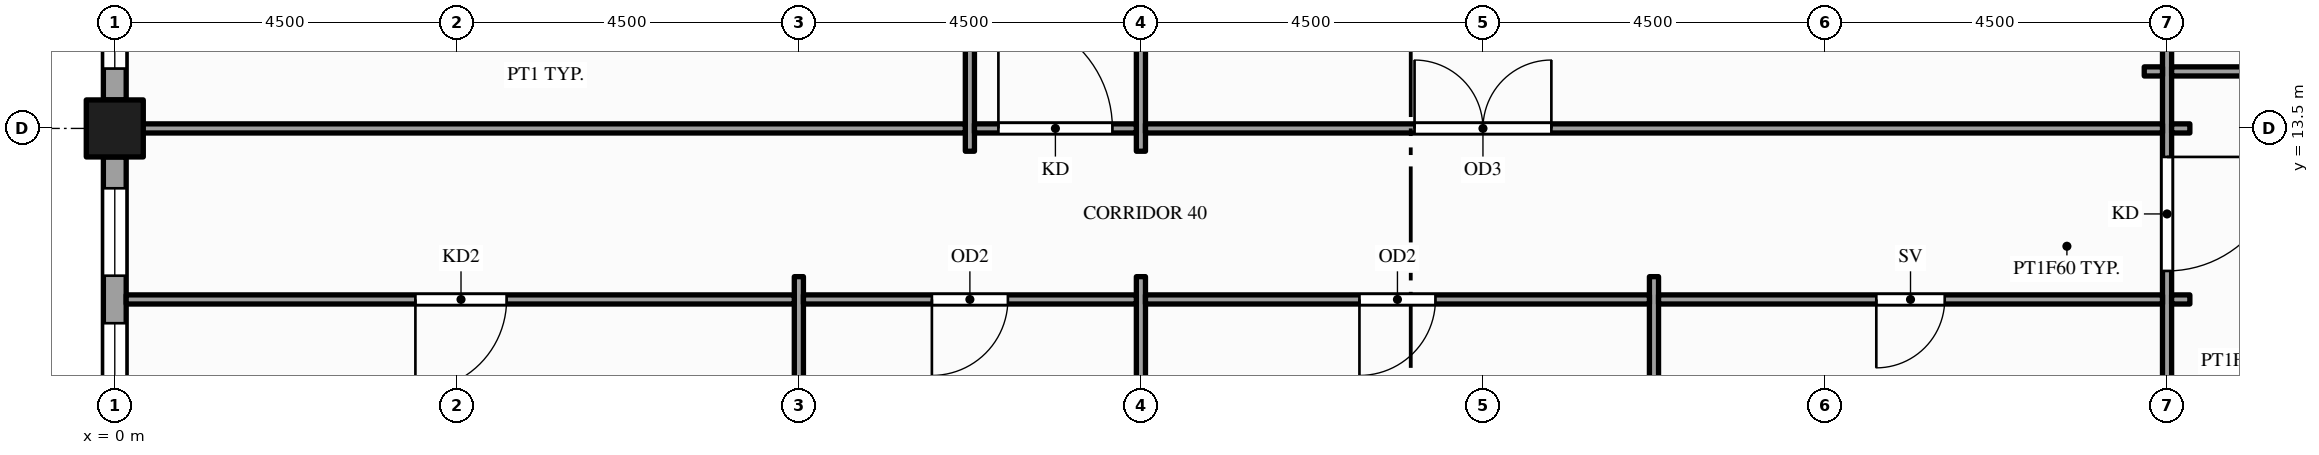
"""IFC4 building model, lengths in metres.
Left out: names, types, materials, properties, quantities, classifications, styles, units other than length and angle.
Written with IfcOpenShell. Run it as: python <this file> out.ifc"""

import sys

from ifc_helpers import new_model, si_unit, direction, frame, frame_2d, origin, origin_2d, place, context, subcontext, project, spatial, rectangle, hollow_rectangle, extrude, element, fill, save


model = new_model("IFC4")
c1 = context("Model", 3, precision=1e-05, world=origin(), true_north=direction((0.0, 1.0)))
c2 = subcontext(c1, "Body", "Model", "MODEL_VIEW")
j1 = project(units=[si_unit("LENGTHUNIT", "METRE"), si_unit("PLANEANGLEUNIT", "RADIAN")], contexts=[c1])
p1 = place(None, origin())
s1 = spatial("IfcSite", under=j1, at=p1, CompositionType="ELEMENT")
p2 = place(p1, origin())
s2 = spatial("IfcBuilding", under=s1, at=p2, CompositionType="ELEMENT")
p3 = place(p2, frame((0.0, 0.0, 211.0)))
s3 = spatial("IfcBuildingStorey", under=s2, at=p3, CompositionType="ELEMENT", Elevation=211.0)
p4 = place(p3, frame((0.0, 13.5, -0.15), z_axis=(0.0, 0.0, 1.0), x_axis=(1.0, 0.0, 0.0)))
e1 = element("IfcColumn", 1, at=p4, inside=s3, PredefinedType="COLUMN", context=c2, shape_type="SweptSolid", body=[
    extrude(hollow_rectangle(XDim=0.75, YDim=0.75, WallThickness=0.036, at=origin_2d()), origin(), (0.0, 0.0, 1.0), 4.0),
])
p5 = place(p3, frame((0.0, 17.625, 0.0), z_axis=(0.0, 0.0, 1.0), x_axis=(0.0, -1.0, 0.0)))
e2 = element("IfcWall", 2, at=p5, inside=s3, PredefinedType="STANDARD", context=c2, shape_type="SweptSolid", body=[
    extrude(rectangle(XDim=3.75, YDim=0.3, at=frame_2d((1.875, 0.0))), origin(), (0.0, 0.0, 1.0), 3.157),
])
p6 = place(p5, frame((0.413, 0.0, 0.9)))
e3 = element("IfcOpeningElement", 3, at=p6, cuts=e2, PredefinedType="OPENING", context=c2, shape_type="SweptSolid", body=[
    extrude(rectangle(XDim=1.15, YDim=2.0, at=frame_2d((0.575, 1.0))), frame((0.0, 0.16, 0.0), z_axis=(0.0, -1.0, 0.0), x_axis=(1.0, 0.0, 0.0)), (0.0, 0.0, 1.0), 0.32),
])
p7 = place(p5, frame((2.188, 0.0, 0.9)))
e4 = element("IfcOpeningElement", 4, at=p7, cuts=e2, PredefinedType="OPENING", context=c2, shape_type="SweptSolid", body=[
    extrude(rectangle(XDim=1.15, YDim=2.0, at=frame_2d((0.575, 1.0))), frame((0.0, 0.16, 0.0), z_axis=(0.0, -1.0, 0.0), x_axis=(1.0, 0.0, 0.0)), (0.0, 0.0, 1.0), 0.32),
])
p8 = place(p3, frame((0.0, 13.125, 0.0), z_axis=(0.0, 0.0, 1.0), x_axis=(0.0, -1.0, 0.0)))
e5 = element("IfcWall", 5, at=p8, inside=s3, PredefinedType="STANDARD", context=c2, shape_type="SweptSolid", body=[
    extrude(rectangle(XDim=3.75, YDim=0.3, at=frame_2d((1.875, 0.0))), origin(), (0.0, 0.0, 1.0), 3.157),
])
p9 = place(p8, frame((0.413, 0.0, 0.9)))
e6 = element("IfcOpeningElement", 6, at=p9, cuts=e5, PredefinedType="OPENING", context=c2, shape_type="SweptSolid", body=[
    extrude(rectangle(XDim=1.15, YDim=2.0, at=frame_2d((0.575, 1.0))), frame((0.0, 0.16, 0.0), z_axis=(0.0, -1.0, 0.0), x_axis=(1.0, 0.0, 0.0)), (0.0, 0.0, 1.0), 0.32),
])
p10 = place(p8, frame((2.188, 0.0, 0.9)))
e7 = element("IfcOpeningElement", 7, at=p10, cuts=e5, PredefinedType="OPENING", context=c2, shape_type="SweptSolid", body=[
    extrude(rectangle(XDim=1.15, YDim=2.0, at=frame_2d((0.575, 1.0))), frame((0.0, 0.16, 0.0), z_axis=(0.0, -1.0, 0.0), x_axis=(1.0, 0.0, 0.0)), (0.0, 0.0, 1.0), 0.32),
])
p11 = place(p3, frame((9.0, 3.875, 0.0), z_axis=(0.0, 0.0, 1.0), x_axis=(0.0, 1.0, 0.0)))
e8 = element("IfcWall", 8, at=p11, inside=s3, PredefinedType="PARTITIONING", context=c2, shape_type="SweptSolid", body=[
    extrude(rectangle(XDim=7.675, YDim=0.12, at=frame_2d((3.837, 0.0))), origin(), (0.0, 0.0, 1.0), 2.87),
])
p12 = place(p3, frame((11.25, 13.2, 0.0), z_axis=(0.0, 0.0, 1.0), x_axis=(0.0, 1.0, 0.0)))
e9 = element("IfcWall", 9, at=p12, inside=s3, PredefinedType="PARTITIONING", context=c2, shape_type="SweptSolid", body=[
    extrude(rectangle(XDim=18.6, YDim=0.12, at=frame_2d((9.3, 0.0))), origin(), (0.0, 0.0, 1.0), 2.6),
])
p13 = place(p12, frame((3.175, 0.0, 0.0)))
e10 = element("IfcOpeningElement", 10, at=p13, cuts=e9, PredefinedType="OPENING", context=c2, shape_type="SweptSolid", body=[
    extrude(rectangle(XDim=1.0, YDim=2.1, at=frame_2d((0.5, 1.05))), frame((0.0, 0.07, 0.0), z_axis=(0.0, -1.0, 0.0), x_axis=(1.0, 0.0, 0.0)), (0.0, 0.0, 1.0), 0.14),
])
p14 = place(p12, frame((9.955, 0.0, 0.0)))
e11 = element("IfcOpeningElement", 11, at=p14, cuts=e9, PredefinedType="OPENING", context=c2, shape_type="SweptSolid", body=[
    extrude(rectangle(XDim=1.0, YDim=2.1, at=frame_2d((0.5, 1.05))), frame((0.0, 0.07, 0.0), z_axis=(0.0, -1.0, 0.0), x_axis=(1.0, 0.0, 0.0)), (0.0, 0.0, 1.0), 0.14),
])
p15 = place(p3, frame((13.5, 0.15, 0.0), z_axis=(0.0, 0.0, 1.0), x_axis=(0.0, 1.0, 0.0)))
e12 = element("IfcWall", 12, at=p15, inside=s3, PredefinedType="PARTITIONING", context=c2, shape_type="SweptSolid", body=[
    extrude(rectangle(XDim=11.4, YDim=0.12, at=frame_2d((5.7, 0.0))), origin(), (0.0, 0.0, 1.0), 2.87),
])
p16 = place(p3, frame((13.5, 13.2, 0.0), z_axis=(0.0, 0.0, 1.0), x_axis=(0.0, 1.0, 0.0)))
e13 = element("IfcWall", 13, at=p16, inside=s3, PredefinedType="PARTITIONING", context=c2, shape_type="SweptSolid", body=[
    extrude(rectangle(XDim=18.6, YDim=0.12, at=frame_2d((9.3, 0.0))), origin(), (0.0, 0.0, 1.0), 2.6),
])
p17 = place(p16, frame((4.2, 0.0, 0.0)))
e14 = element("IfcOpeningElement", 14, at=p17, cuts=e13, PredefinedType="OPENING", context=c2, shape_type="SweptSolid", body=[
    extrude(rectangle(XDim=1.2, YDim=2.1, at=frame_2d((0.6, 1.05))), frame((0.0, 0.07, 0.0), z_axis=(0.0, -1.0, 0.0), x_axis=(1.0, 0.0, 0.0)), (0.0, 0.0, 1.0), 0.14),
])
p18 = place(p3, frame((20.25, 0.15, 0.0), z_axis=(0.0, 0.0, 1.0), x_axis=(0.0, 1.0, 0.0)))
e15 = element("IfcWall", 15, at=p18, inside=s3, PredefinedType="PARTITIONING", context=c2, shape_type="SweptSolid", body=[
    extrude(rectangle(XDim=11.4, YDim=0.12, at=frame_2d((5.7, 0.0))), origin(), (0.0, 0.0, 1.0), 2.87),
])
p19 = place(p3, frame((27.0, -1.35, 0.0), z_axis=(0.0, 0.0, 1.0), x_axis=(0.0, 1.0, 0.0)))
e16 = element("IfcWall", 16, at=p19, inside=s3, PredefinedType="PARTITIONING", context=c2, shape_type="SweptSolid", body=[
    extrude(rectangle(XDim=22.48, YDim=0.12, at=frame_2d((11.24, 0.0))), origin(), (0.0, 0.0, 1.0), 2.87),
])
p20 = place(p19, frame((12.975, 0.0, 0.0)))
e17 = element("IfcOpeningElement", 17, at=p20, cuts=e16, PredefinedType="OPENING", context=c2, shape_type="SweptSolid", body=[
    extrude(rectangle(XDim=1.5, YDim=2.1, at=frame_2d((0.75, 1.05))), frame((0.0, 0.07, 0.0), z_axis=(0.0, -1.0, 0.0), x_axis=(1.0, 0.0, 0.0)), (0.0, 0.0, 1.0), 0.14),
])
p21 = place(p3, frame((0.15, 11.25, 0.0), z_axis=(0.0, 0.0, 1.0), x_axis=(1.0, 0.0, 0.0)))
e18 = element("IfcWall", 18, at=p21, inside=s3, PredefinedType="PARTITIONING", context=c2, shape_type="SweptSolid", body=[
    extrude(rectangle(XDim=8.79, YDim=0.12, at=frame_2d((4.395, 0.0))), origin(), (0.0, 0.0, 1.0), 2.87),
])
p22 = place(p21, frame((3.805, 0.0, 0.0)))
e19 = element("IfcOpeningElement", 19, at=p22, cuts=e18, PredefinedType="OPENING", context=c2, shape_type="SweptSolid", body=[
    extrude(rectangle(XDim=1.2, YDim=2.1, at=frame_2d((0.6, 1.05))), frame((0.0, 0.07, 0.0), z_axis=(0.0, -1.0, 0.0), x_axis=(1.0, 0.0, 0.0)), (0.0, 0.0, 1.0), 0.14),
])
p23 = place(p3, frame((9.06, 11.25, 0.0), z_axis=(0.0, 0.0, 1.0), x_axis=(1.0, 0.0, 0.0)))
e20 = element("IfcWall", 20, at=p23, inside=s3, PredefinedType="PARTITIONING", context=c2, shape_type="SweptSolid", body=[
    extrude(rectangle(XDim=4.38, YDim=0.12, at=frame_2d((2.19, 0.0))), origin(), (0.0, 0.0, 1.0), 2.87),
])
p24 = place(p23, frame((1.69, 0.0, 0.0)))
e21 = element("IfcOpeningElement", 21, at=p24, cuts=e20, PredefinedType="OPENING", context=c2, shape_type="SweptSolid", body=[
    extrude(rectangle(XDim=1.0, YDim=2.1, at=frame_2d((0.5, 1.05))), frame((0.0, 0.07, 0.0), z_axis=(0.0, -1.0, 0.0), x_axis=(1.0, 0.0, 0.0)), (0.0, 0.0, 1.0), 0.14),
])
p25 = place(p3, frame((13.56, 11.25, 0.0), z_axis=(0.0, 0.0, 1.0), x_axis=(1.0, 0.0, 0.0)))
e22 = element("IfcWall", 22, at=p25, inside=s3, PredefinedType="PARTITIONING", context=c2, shape_type="SweptSolid", body=[
    extrude(rectangle(XDim=6.63, YDim=0.12, at=frame_2d((3.315, 0.0))), origin(), (0.0, 0.0, 1.0), 2.87),
])
p26 = place(p25, frame((2.815, 0.0, 0.0)))
e23 = element("IfcOpeningElement", 23, at=p26, cuts=e22, PredefinedType="OPENING", context=c2, shape_type="SweptSolid", body=[
    extrude(rectangle(XDim=1.0, YDim=2.1, at=frame_2d((0.5, 1.05))), frame((0.0, 0.07, 0.0), z_axis=(0.0, -1.0, 0.0), x_axis=(1.0, 0.0, 0.0)), (0.0, 0.0, 1.0), 0.14),
])
p27 = place(p3, frame((20.31, 11.25, 0.0), z_axis=(0.0, 0.0, 1.0), x_axis=(1.0, 0.0, 0.0)))
e24 = element("IfcWall", 24, at=p27, inside=s3, PredefinedType="PARTITIONING", context=c2, shape_type="SweptSolid", body=[
    extrude(rectangle(XDim=6.63, YDim=0.12, at=frame_2d((3.315, 0.0))), origin(), (0.0, 0.0, 1.0), 2.76),
])
p28 = place(p27, frame((2.865, 0.0, 0.0)))
e25 = element("IfcOpeningElement", 25, at=p28, cuts=e24, PredefinedType="OPENING", context=c2, shape_type="SweptSolid", body=[
    extrude(rectangle(XDim=0.9, YDim=2.1, at=frame_2d((0.45, 1.05))), frame((0.0, 0.07, 0.0), z_axis=(0.0, -1.0, 0.0), x_axis=(1.0, 0.0, 0.0)), (0.0, 0.0, 1.0), 0.14),
])
p29 = place(p3, frame((27.06, 11.25, 0.0), z_axis=(0.0, 0.0, 1.0), x_axis=(1.0, 0.0, 0.0)))
e26 = element("IfcWall", 26, at=p29, inside=s3, PredefinedType="PARTITIONING", context=c2, shape_type="SweptSolid", body=[
    extrude(rectangle(XDim=0.24, YDim=0.12, at=frame_2d((0.12, 0.0))), origin(), (0.0, 0.0, 1.0), 2.87),
])
p30 = place(p3, frame((0.15, 13.5, 0.0), z_axis=(0.0, 0.0, 1.0), x_axis=(1.0, 0.0, 0.0)))
e27 = element("IfcWall", 27, at=p30, inside=s3, PredefinedType="PARTITIONING", context=c2, shape_type="SweptSolid", body=[
    extrude(rectangle(XDim=11.04, YDim=0.12, at=frame_2d((5.52, 0.0))), origin(), (0.0, 0.0, 1.0), 2.87),
])
p31 = place(p3, frame((11.31, 13.5, 0.0), z_axis=(0.0, 0.0, 1.0), x_axis=(1.0, 0.0, 0.0)))
e28 = element("IfcWall", 28, at=p31, inside=s3, PredefinedType="PARTITIONING", context=c2, shape_type="SweptSolid", body=[
    extrude(rectangle(XDim=2.13, YDim=0.12, at=frame_2d((1.065, 0.0))), origin(), (0.0, 0.0, 1.0), 2.87),
])
p32 = place(p31, frame((0.315, 0.0, 0.0)))
e29 = element("IfcOpeningElement", 29, at=p32, cuts=e28, PredefinedType="OPENING", context=c2, shape_type="SweptSolid", body=[
    extrude(rectangle(XDim=1.5, YDim=2.1, at=frame_2d((0.75, 1.05))), frame((0.0, 0.07, 0.0), z_axis=(0.0, -1.0, 0.0), x_axis=(1.0, 0.0, 0.0)), (0.0, 0.0, 1.0), 0.14),
])
p33 = place(p3, frame((13.56, 13.5, 0.0), z_axis=(0.0, 0.0, 1.0), x_axis=(1.0, 0.0, 0.0)))
e30 = element("IfcWall", 30, at=p33, inside=s3, PredefinedType="PARTITIONING", context=c2, shape_type="SweptSolid", body=[
    extrude(rectangle(XDim=13.38, YDim=0.12, at=frame_2d((6.69, 0.0))), origin(), (0.0, 0.0, 1.0), 2.76),
])
p34 = place(p33, frame((3.54, 0.0, 0.0)))
e31 = element("IfcOpeningElement", 31, at=p34, cuts=e30, PredefinedType="OPENING", context=c2, shape_type="SweptSolid", body=[
    extrude(rectangle(XDim=1.8, YDim=2.1, at=frame_2d((0.9, 1.05))), frame((0.0, 0.07, 0.0), z_axis=(0.0, -1.0, 0.0), x_axis=(1.0, 0.0, 0.0)), (0.0, 0.0, 1.0), 0.14),
])
for number, where, z_axis, x_axis in (
    (32, (27.06, 13.5, 0.0), (0.0, 0.0, 1.0), (1.0, 0.0, 0.0)),
    (33, (26.7, 14.25, 0.0), (0.0, 0.0, 1.0), (1.0, 0.0, 0.0)),
):
    element("IfcWall", number, at=place(p3, frame(where, z_axis=z_axis, x_axis=x_axis)), inside=s3, PredefinedType="PARTITIONING", context=c2, shape_type="SweptSolid", body=[
        extrude(rectangle(XDim=0.24, YDim=0.12, at=frame_2d((0.12, 0.0))), origin(), (0.0, 0.0, 1.0), 2.87),
    ])
p35 = place(p3, frame((27.06, 14.25, 0.0), z_axis=(0.0, 0.0, 1.0), x_axis=(1.0, 0.0, 0.0)))
e34 = element("IfcWall", 34, at=p35, inside=s3, PredefinedType="PARTITIONING", context=c2, shape_type="SweptSolid", body=[
    extrude(rectangle(XDim=2.13, YDim=0.12, at=frame_2d((1.065, 0.0))), origin(), (0.0, 0.0, 1.0), 2.87),
])
p36 = place(p7, origin())
e35 = element("IfcWindow", 35, at=p36, inside=s3, PartitioningType="SINGLE_PANEL", PredefinedType="WINDOW", context=c2, shape_type="SweptSolid", body=[
    extrude(rectangle(XDim=1.15, YDim=2.0, at=frame_2d((0.575, 1.0))), frame((0.0, 0.03, 0.0), z_axis=(0.0, -1.0, 0.0), x_axis=(1.0, 0.0, 0.0)), (0.0, 0.0, 1.0), 0.06),
])
fill(e4, e35)
p37 = place(p9, origin())
e36 = element("IfcWindow", 36, at=p37, inside=s3, PartitioningType="SINGLE_PANEL", PredefinedType="WINDOW", context=c2, shape_type="SweptSolid", body=[
    extrude(rectangle(XDim=1.15, YDim=2.0, at=frame_2d((0.575, 1.0))), frame((0.0, 0.03, 0.0), z_axis=(0.0, -1.0, 0.0), x_axis=(1.0, 0.0, 0.0)), (0.0, 0.0, 1.0), 0.06),
])
fill(e6, e36)
p38 = place(p10, origin())
e37 = element("IfcWindow", 37, at=p38, inside=s3, PartitioningType="SINGLE_PANEL", PredefinedType="WINDOW", context=c2, shape_type="SweptSolid", body=[
    extrude(rectangle(XDim=1.15, YDim=2.0, at=frame_2d((0.575, 1.0))), frame((0.0, 0.03, 0.0), z_axis=(0.0, -1.0, 0.0), x_axis=(1.0, 0.0, 0.0)), (0.0, 0.0, 1.0), 0.06),
])
fill(e7, e37)
p39 = place(p20, origin())
e38 = element("IfcDoor", 38, at=p39, inside=s3, OperationType="SINGLE_SWING_RIGHT", PredefinedType="DOOR", context=c2, shape_type="SweptSolid", body=[
    extrude(rectangle(XDim=1.5, YDim=2.1, at=frame_2d((0.75, 1.05))), frame((0.0, 0.025, 0.0), z_axis=(0.0, -1.0, 0.0), x_axis=(1.0, 0.0, 0.0)), (0.0, 0.0, 1.0), 0.05),
])
fill(e17, e38)
p40 = place(p22, origin())
e39 = element("IfcDoor", 39, at=p40, inside=s3, OperationType="SINGLE_SWING_LEFT", PredefinedType="DOOR", context=c2, shape_type="SweptSolid", body=[
    extrude(rectangle(XDim=1.2, YDim=2.1, at=frame_2d((0.6, 1.05))), frame((0.0, 0.025, 0.0), z_axis=(0.0, -1.0, 0.0), x_axis=(1.0, 0.0, 0.0)), (0.0, 0.0, 1.0), 0.05),
])
fill(e19, e39)
p41 = place(p24, origin())
e40 = element("IfcDoor", 40, at=p41, inside=s3, OperationType="SINGLE_SWING_LEFT", PredefinedType="DOOR", context=c2, shape_type="SweptSolid", body=[
    extrude(rectangle(XDim=1.0, YDim=2.1, at=frame_2d((0.5, 1.05))), frame((0.0, 0.025, 0.0), z_axis=(0.0, -1.0, 0.0), x_axis=(1.0, 0.0, 0.0)), (0.0, 0.0, 1.0), 0.05),
])
fill(e21, e40)
p42 = place(p26, origin())
e41 = element("IfcDoor", 41, at=p42, inside=s3, OperationType="SINGLE_SWING_LEFT", PredefinedType="DOOR", context=c2, shape_type="SweptSolid", body=[
    extrude(rectangle(XDim=1.0, YDim=2.1, at=frame_2d((0.5, 1.05))), frame((0.0, 0.025, 0.0), z_axis=(0.0, -1.0, 0.0), x_axis=(1.0, 0.0, 0.0)), (0.0, 0.0, 1.0), 0.05),
])
fill(e23, e41)
p43 = place(p28, origin())
e42 = element("IfcDoor", 42, at=p43, inside=s3, OperationType="SINGLE_SWING_LEFT", PredefinedType="DOOR", context=c2, shape_type="SweptSolid", body=[
    extrude(rectangle(XDim=0.9, YDim=2.1, at=frame_2d((0.45, 1.05))), frame((0.0, 0.025, 0.0), z_axis=(0.0, -1.0, 0.0), x_axis=(1.0, 0.0, 0.0)), (0.0, 0.0, 1.0), 0.05),
])
fill(e25, e42)
p44 = place(p34, origin())
e43 = element("IfcDoor", 43, at=p44, inside=s3, OperationType="DOUBLE_DOOR_SINGLE_SWING", PredefinedType="DOOR", context=c2, shape_type="SweptSolid", body=[
    extrude(rectangle(XDim=1.8, YDim=2.1, at=frame_2d((0.9, 1.05))), frame((0.0, 0.025, 0.0), z_axis=(0.0, -1.0, 0.0), x_axis=(1.0, 0.0, 0.0)), (0.0, 0.0, 1.0), 0.05),
])
fill(e31, e43)
p45 = place(p32, origin())
e44 = element("IfcDoor", 44, at=p45, inside=s3, OperationType="SINGLE_SWING_LEFT", PredefinedType="DOOR", context=c2, shape_type="SweptSolid", body=[
    extrude(rectangle(XDim=1.5, YDim=2.1, at=frame_2d((0.75, 1.05))), frame((0.0, 0.025, 0.0), z_axis=(0.0, -1.0, 0.0), x_axis=(1.0, 0.0, 0.0)), (0.0, 0.0, 1.0), 0.05),
])
fill(e29, e44)
save(model, sys.argv[1])
